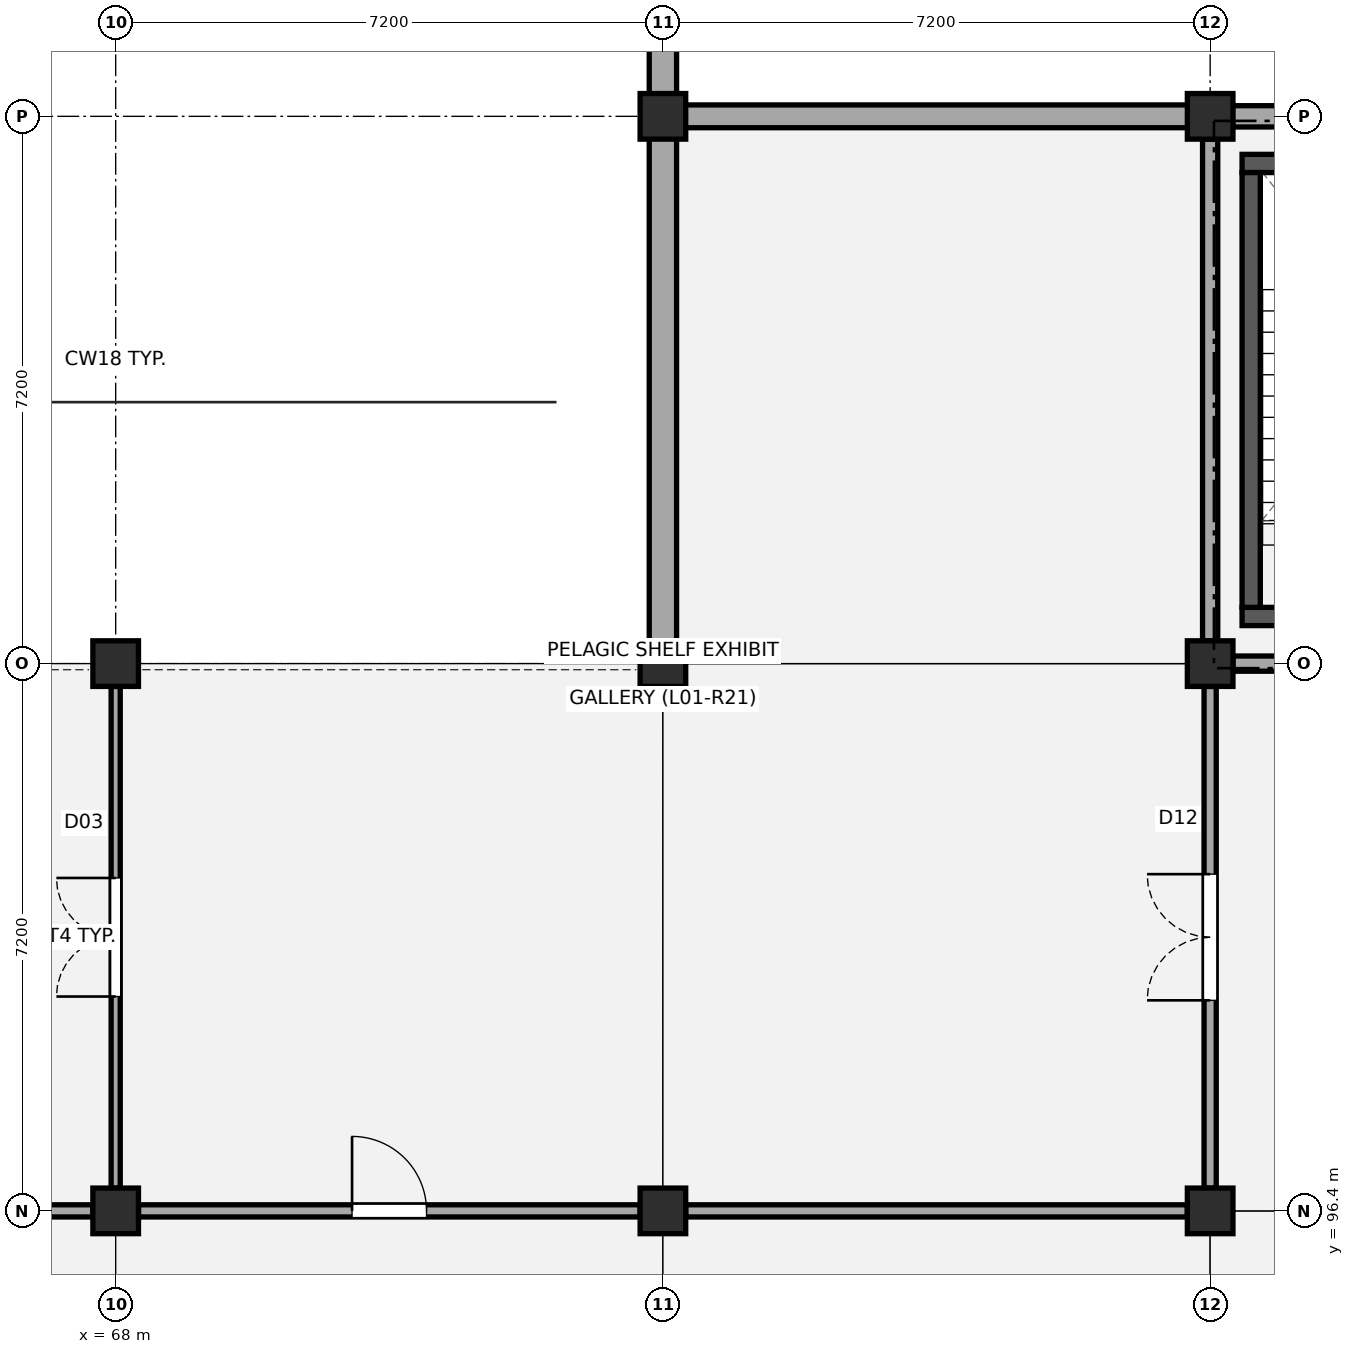
"""IFC4 building model, lengths in metres.
Left out: names, types, materials, properties, quantities, classifications, styles, units other than length and angle.
Written with IfcOpenShell. Run it as: python <this file> out.ifc"""

import sys

from ifc_helpers import new_model, si_unit, direction, frame, frame_2d, origin, origin_2d, place, context, subcontext, project, spatial, rectangle, extrude, element, fill, save


model = new_model("IFC4")
c1 = context("Model", 3, precision=1e-05, world=origin(), true_north=direction((0.0, 1.0)))
c2 = subcontext(c1, "Body", "Model", "MODEL_VIEW")
j1 = project(units=[si_unit("LENGTHUNIT", "METRE"), si_unit("PLANEANGLEUNIT", "RADIAN")], contexts=[c1])
p1 = place(None, origin())
s1 = spatial("IfcSite", under=j1, at=p1, CompositionType="ELEMENT")
p2 = place(p1, origin())
s2 = spatial("IfcBuilding", under=s1, at=p2, CompositionType="ELEMENT")
p3 = place(p2, frame((0.0, 0.0, 4.68)))
s3 = spatial("IfcBuildingStorey", under=s2, at=p3, CompositionType="ELEMENT", Elevation=4.68)
for number, where, z_axis, x_axis in (
    (1, (68.0, 96.4, 0.0), (0.0, 0.0, 1.0), (1.0, 0.0, 0.0)),
    (2, (68.0, 103.6, 0.0), (0.0, 0.0, 1.0), (1.0, 0.0, 0.0)),
    (3, (75.2, 96.4, 0.0), (0.0, 0.0, 1.0), (1.0, 0.0, 0.0)),
    (4, (75.2, 103.6, 0.0), (0.0, 0.0, 1.0), (1.0, 0.0, 0.0)),
    (5, (75.2, 110.8, 0.0), (0.0, 0.0, 1.0), (1.0, 0.0, 0.0)),
    (6, (82.4, 96.4, 0.0), (0.0, 0.0, 1.0), (1.0, 0.0, 0.0)),
    (7, (82.4, 103.6, 0.0), (0.0, 0.0, 1.0), (1.0, 0.0, 0.0)),
    (8, (82.4, 110.8, 0.0), (0.0, 0.0, 1.0), (1.0, 0.0, 0.0)),
):
    element("IfcColumn", number, at=place(p3, frame(where, z_axis=z_axis, x_axis=x_axis)), inside=s3, PredefinedType="COLUMN", context=c2, shape_type="SweptSolid", body=[
        extrude(rectangle(XDim=0.6, YDim=0.6, at=origin_2d()), origin(), (0.0, 0.0, 1.0), 4.5),
    ])
p4 = place(p3, frame((75.495, 110.8, 0.0), z_axis=(0.0, 0.0, 1.0), x_axis=(1.0, 0.0, 0.0)))
e9 = element("IfcWall", 9, at=p4, inside=s3, PredefinedType="STANDARD", context=c2, shape_type="SweptSolid", body=[
    extrude(rectangle(XDim=6.61, YDim=0.3, at=frame_2d((3.305, 0.0))), origin(), (0.0, 0.0, 1.0), 3.49),
])
p5 = place(p3, frame((82.695, 110.8, 0.0), z_axis=(0.0, 0.0, 1.0), x_axis=(1.0, 0.0, 0.0)))
e10 = element("IfcWall", 10, at=p5, inside=s3, PredefinedType="STANDARD", context=c2, shape_type="SweptSolid", body=[
    extrude(rectangle(XDim=6.61, YDim=0.28, at=frame_2d((3.305, 0.0))), origin(), (0.0, 0.0, 1.0), 3.51),
])
p6 = place(p3, frame((75.2, 103.895, 0.0), z_axis=(0.0, 0.0, 1.0), x_axis=(0.0, 1.0, 0.0)))
e11 = element("IfcWall", 11, at=p6, inside=s3, PredefinedType="STANDARD", context=c2, shape_type="SweptSolid", body=[
    extrude(rectangle(XDim=8.145, YDim=0.36, at=frame_2d((4.073, 0.0))), origin(), (0.0, 0.0, 1.0), 3.54),
])
p7 = place(p2, origin())
s4 = spatial("IfcBuildingStorey", under=s2, at=p7, CompositionType="ELEMENT", Elevation=0.0)
p8 = place(p7, frame((73.8, 107.04, 0.0), z_axis=(0.0, 0.0, 1.0), x_axis=(1.0, 0.0, 0.0)))
e12 = element("IfcWall", 12, at=p8, inside=s4, PredefinedType="STANDARD", context=c2, shape_type="SweptSolid", body=[
    extrude(rectangle(XDim=1.4, YDim=0.34, at=frame_2d((0.7, 0.0))), origin(), (0.0, 0.0, 1.0), 8.87),
])
for number, where, z_axis, x_axis in (
    (13, (82.82, 104.22, 0.0), (0.0, 0.0, 1.0), (1.0, 0.0, 0.0)),
    (14, (82.82, 110.18, 0.0), (0.0, 0.0, 1.0), (1.0, 0.0, 0.0)),
):
    element("IfcWall", number, at=place(p3, frame(where, z_axis=z_axis, x_axis=x_axis)), inside=s3, PredefinedType="SHEAR", context=c2, shape_type="SweptSolid", body=[
        extrude(rectangle(XDim=4.24, YDim=0.24, at=frame_2d((2.12, 0.0))), origin(), (0.0, 0.0, 1.0), 4.22),
    ])
p9 = place(p3, frame((82.94, 104.34, 0.0), z_axis=(0.0, 0.0, 1.0), x_axis=(0.0, 1.0, 0.0)))
e15 = element("IfcWall", 15, at=p9, inside=s3, PredefinedType="SHEAR", context=c2, shape_type="SweptSolid", body=[
    extrude(rectangle(XDim=5.72, YDim=0.24, at=frame_2d((2.86, 0.0))), origin(), (0.0, 0.0, 1.0), 4.22),
])
p10 = place(p3, frame((82.4, 103.9, 0.0), z_axis=(0.0, 0.0, 1.0), x_axis=(0.0, 1.0, 0.0)))
e16 = element("IfcWall", 16, at=p10, inside=s3, PredefinedType="PARTITIONING", context=c2, shape_type="SweptSolid", body=[
    extrude(rectangle(XDim=6.6, YDim=0.2, at=frame_2d((3.3, 0.0))), origin(), (0.0, 0.0, 1.0), 3.54),
])
p11 = place(p3, frame((82.7, 103.6, 0.0), z_axis=(0.0, 0.0, 1.0), x_axis=(1.0, 0.0, 0.0)))
e17 = element("IfcWall", 17, at=p11, inside=s3, PredefinedType="PARTITIONING", context=c2, shape_type="SweptSolid", body=[
    extrude(rectangle(XDim=4.24, YDim=0.2, at=frame_2d((2.12, 0.0))), origin(), (0.0, 0.0, 1.0), 3.59),
])
p12 = place(p3, frame((61.1, 96.4, 0.0), z_axis=(0.0, 0.0, 1.0), x_axis=(1.0, 0.0, 0.0)))
e18 = element("IfcWall", 18, at=p12, inside=s3, PredefinedType="PARTITIONING", context=c2, shape_type="SweptSolid", body=[
    extrude(rectangle(XDim=6.6, YDim=0.16, at=frame_2d((3.3, 0.0))), origin(), (0.0, 0.0, 1.0), 3.59),
])
p13 = place(p12, frame((2.81, 0.0, 0.0)))
e19 = element("IfcOpeningElement", 19, at=p13, cuts=e18, PredefinedType="OPENING", context=c2, shape_type="SweptSolid", body=[
    extrude(rectangle(XDim=0.98, YDim=2.12, at=frame_2d((0.49, 1.06))), frame((0.0, 0.09, 0.0), z_axis=(0.0, -1.0, 0.0), x_axis=(1.0, 0.0, 0.0)), (0.0, 0.0, 1.0), 0.18),
])
p14 = place(p3, frame((68.0, 96.7, 0.0), z_axis=(0.0, 0.0, 1.0), x_axis=(0.0, 1.0, 0.0)))
e20 = element("IfcWall", 20, at=p14, inside=s3, PredefinedType="PARTITIONING", context=c2, shape_type="SweptSolid", body=[
    extrude(rectangle(XDim=6.6, YDim=0.12, at=frame_2d((3.3, 0.0))), origin(), (0.0, 0.0, 1.0), 3.59),
])
p15 = place(p14, frame((2.52, 0.0, 0.0)))
e21 = element("IfcOpeningElement", 21, at=p15, cuts=e20, PredefinedType="OPENING", context=c2, shape_type="SweptSolid", body=[
    extrude(rectangle(XDim=1.56, YDim=2.2, at=frame_2d((0.78, 1.1))), frame((0.0, 0.07, 0.0), z_axis=(0.0, -1.0, 0.0), x_axis=(1.0, 0.0, 0.0)), (0.0, 0.0, 1.0), 0.14),
])
p16 = place(p3, frame((68.3, 96.4, 0.0), z_axis=(0.0, 0.0, 1.0), x_axis=(1.0, 0.0, 0.0)))
e22 = element("IfcWall", 22, at=p16, inside=s3, PredefinedType="PARTITIONING", context=c2, shape_type="SweptSolid", body=[
    extrude(rectangle(XDim=6.6, YDim=0.16, at=frame_2d((3.3, 0.0))), origin(), (0.0, 0.0, 1.0), 3.54),
])
p17 = place(p16, frame((2.81, 0.0, 0.0)))
e23 = element("IfcOpeningElement", 23, at=p17, cuts=e22, PredefinedType="OPENING", context=c2, shape_type="SweptSolid", body=[
    extrude(rectangle(XDim=0.98, YDim=2.12, at=frame_2d((0.49, 1.06))), frame((0.0, 0.09, 0.0), z_axis=(0.0, -1.0, 0.0), x_axis=(1.0, 0.0, 0.0)), (0.0, 0.0, 1.0), 0.18),
])
p18 = place(p3, frame((75.5, 96.4, 0.0), z_axis=(0.0, 0.0, 1.0), x_axis=(1.0, 0.0, 0.0)))
e24 = element("IfcWall", 24, at=p18, inside=s3, PredefinedType="PARTITIONING", context=c2, shape_type="SweptSolid", body=[
    extrude(rectangle(XDim=6.6, YDim=0.16, at=frame_2d((3.3, 0.0))), origin(), (0.0, 0.0, 1.0), 3.59),
])
p19 = place(p3, frame((82.4, 96.7, 0.0), z_axis=(0.0, 0.0, 1.0), x_axis=(0.0, 1.0, 0.0)))
e25 = element("IfcWall", 25, at=p19, inside=s3, PredefinedType="PARTITIONING", context=c2, shape_type="SweptSolid", body=[
    extrude(rectangle(XDim=6.6, YDim=0.16, at=frame_2d((3.3, 0.0))), origin(), (0.0, 0.0, 1.0), 3.59),
])
p20 = place(p19, frame((2.47, 0.0, 0.0)))
e26 = element("IfcOpeningElement", 26, at=p20, cuts=e25, PredefinedType="OPENING", context=c2, shape_type="SweptSolid", body=[
    extrude(rectangle(XDim=1.66, YDim=2.22, at=frame_2d((0.83, 1.11))), frame((0.0, 0.09, 0.0), z_axis=(0.0, -1.0, 0.0), x_axis=(1.0, 0.0, 0.0)), (0.0, 0.0, 1.0), 0.18),
])
p21 = place(p17, origin())
e27 = element("IfcDoor", 27, at=p21, inside=s3, OperationType="SINGLE_SWING_LEFT", PredefinedType="DOOR", context=c2, shape_type="SweptSolid", body=[
    extrude(rectangle(XDim=0.98, YDim=2.12, at=frame_2d((0.49, 1.06))), frame((0.0, 0.025, 0.0), z_axis=(0.0, -1.0, 0.0), x_axis=(1.0, 0.0, 0.0)), (0.0, 0.0, 1.0), 0.05),
])
fill(e23, e27)
p22 = place(p20, origin())
e28 = element("IfcDoor", 28, at=p22, inside=s3, OperationType="DOUBLE_DOOR_SINGLE_SWING", PredefinedType="DOOR", context=c2, shape_type="SweptSolid", body=[
    extrude(rectangle(XDim=1.66, YDim=2.22, at=frame_2d((0.83, 1.11))), frame((0.0, 0.025, 0.0), z_axis=(0.0, -1.0, 0.0), x_axis=(1.0, 0.0, 0.0)), (0.0, 0.0, 1.0), 0.05),
])
fill(e26, e28)
p23 = place(p15, origin())
e29 = element("IfcDoor", 29, at=p23, inside=s3, OperationType="DOUBLE_DOOR_SINGLE_SWING", PredefinedType="DOOR", context=c2, shape_type="SweptSolid", body=[
    extrude(rectangle(XDim=1.56, YDim=2.2, at=frame_2d((0.78, 1.1))), frame((0.0, 0.025, 0.0), z_axis=(0.0, -1.0, 0.0), x_axis=(1.0, 0.0, 0.0)), (0.0, 0.0, 1.0), 0.05),
])
fill(e21, e29)
save(model, sys.argv[1])
